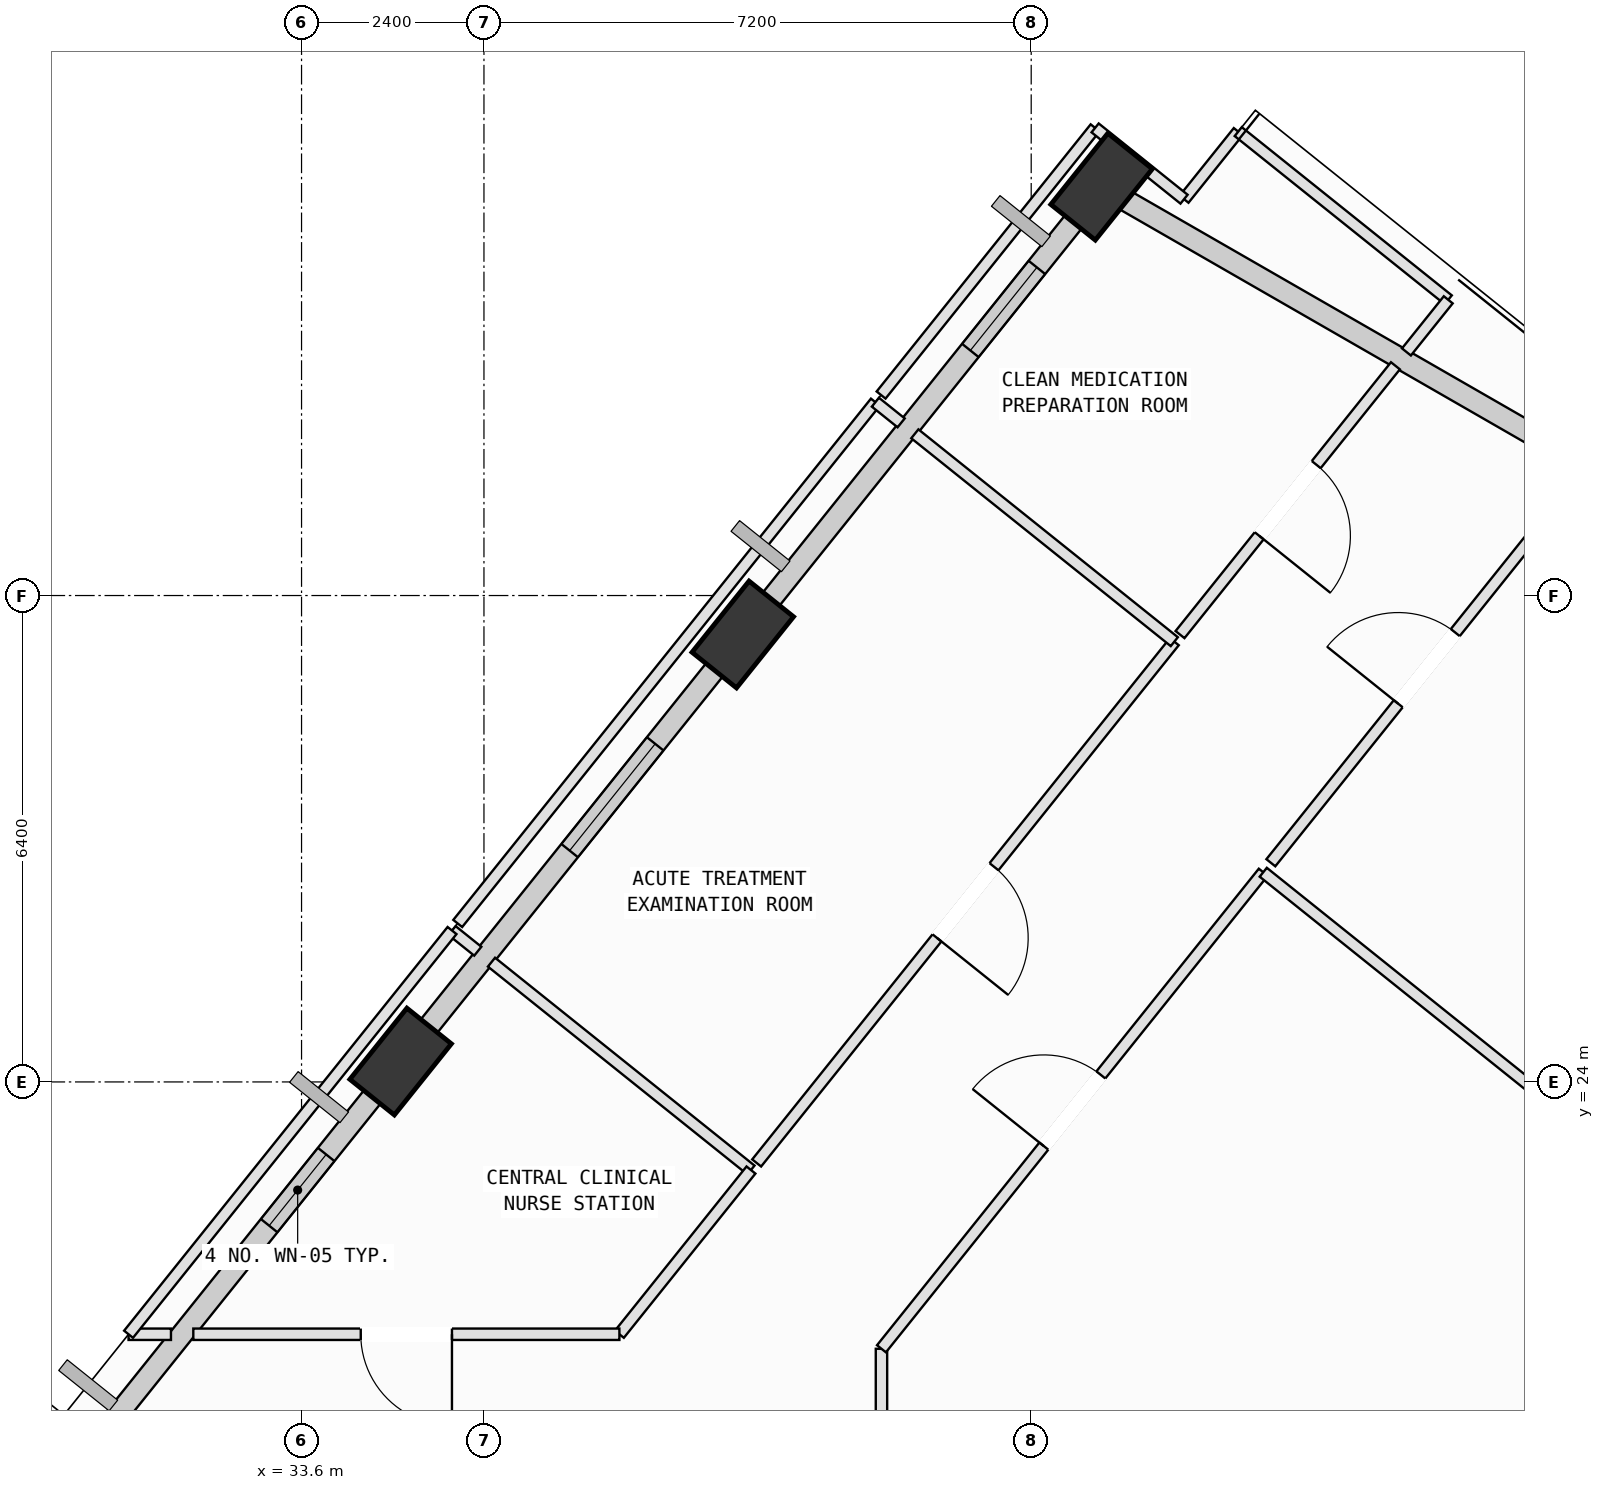
"""IFC4 building model, lengths in metres.
Left out: names, types, materials, properties, quantities, classifications, styles, units other than length and angle.
Written with IfcOpenShell. Run it as: python <this file> out.ifc"""

import sys

from ifc_helpers import new_model, si_unit, direction, frame, frame_2d, origin, origin_2d, place, context, subcontext, project, spatial, rectangle, extrude, element, fill, save


model = new_model("IFC4")
c1 = context("Model", 3, precision=1e-05, world=origin(), true_north=direction((0.0, 1.0)))
c2 = subcontext(c1, "Body", "Model", "MODEL_VIEW")
j1 = project(units=[si_unit("LENGTHUNIT", "METRE"), si_unit("PLANEANGLEUNIT", "RADIAN")], contexts=[c1])
p1 = place(None, origin())
s1 = spatial("IfcSite", under=j1, at=p1, CompositionType="ELEMENT")
p2 = place(p1, origin())
s2 = spatial("IfcBuilding", under=s1, at=p2, CompositionType="ELEMENT")
p3 = place(p2, frame((0.0, 0.0, 243.2)))
s3 = spatial("IfcBuildingStorey", under=s2, at=p3, CompositionType="ELEMENT", Elevation=243.2)
p4 = place(p3, frame((44.126, 35.78, 0.002), z_axis=(-0.045788475912, 0.043166765574, 0.998018058866), x_axis=(0.137842750982, -0.989235806213, 0.049111054847)))
e1 = element("IfcColumn", 1, at=p4, inside=s3, PredefinedType="COLUMN", context=c2, shape_type="SweptSolid", body=[
    extrude(rectangle(XDim=1.2, YDim=0.75, at=origin_2d()), origin(), (0.0, 0.0, 1.0), 4.004),
])
p5 = place(p3, frame((39.405, 29.887, 0.002), z_axis=(-0.021248837038, 0.02387441173, 0.999489119195), x_axis=(0.051546254437, -0.998359061972, 0.024943276301)))
e2 = element("IfcColumn", 2, at=p5, inside=s3, PredefinedType="COLUMN", context=c2, shape_type="SweptSolid", body=[
    extrude(rectangle(XDim=1.2, YDim=0.75, at=origin_2d()), origin(), (0.0, 0.0, 1.0), 3.998),
])
p6 = place(p3, frame((34.904, 24.268, 0.002), z_axis=(0.0021992413, 0.005437013213, 0.999982800965), x_axis=(-0.872261093327, -0.489019053167, 0.004577194397)))
e3 = element("IfcColumn", 3, at=p6, inside=s3, PredefinedType="COLUMN", context=c2, shape_type="SweptSolid", body=[
    extrude(rectangle(XDim=1.2, YDim=0.75, at=origin_2d()), origin(), (0.0, 0.0, 1.0), 3.996),
])
p7 = place(p3, frame((44.363, 35.643, 0.0), z_axis=(0.0, 0.0, 1.0), x_axis=(0.86682135291, -0.498618834521, 0.0)))
e4 = element("IfcWall", 4, at=p7, inside=s3, PredefinedType="SOLIDWALL", context=c2, shape_type="SweptSolid", body=[
    extrude(rectangle(XDim=9.036, YDim=0.28, at=frame_2d((4.518, 0.0))), origin(), (0.0, 0.0, 1.0), 3.265),
])
p8 = place(p3, frame((39.657, 30.202, 0.0), z_axis=(0.0, 0.0, 1.0), x_axis=(0.625252613866, 0.780422429748, 0.0)))
e5 = element("IfcWall", 5, at=p8, inside=s3, PredefinedType="SOLIDWALL", context=c2, shape_type="SweptSolid", body=[
    extrude(rectangle(XDim=6.78, YDim=0.28, at=frame_2d((3.39, 0.0))), origin(), (0.0, 0.0, 1.0), 3.265),
])
p9 = place(p8, frame((4.386, 0.0, 0.75)))
e6 = element("IfcOpeningElement", 6, at=p9, cuts=e5, PredefinedType="OPENING", context=c2, shape_type="SweptSolid", body=[
    extrude(rectangle(XDim=1.4, YDim=1.85, at=frame_2d((0.7, 0.925))), frame((0.0, 0.15, 0.0), z_axis=(0.0, -1.0, 0.0), x_axis=(1.0, 0.0, 0.0)), (0.0, 0.0, 1.0), 0.3),
])
p10 = place(p3, frame((35.159, 24.587, 0.0), z_axis=(0.0, 0.0, 1.0), x_axis=(0.625266247594, 0.780411506591, 0.0)))
e7 = element("IfcWall", 7, at=p10, inside=s3, PredefinedType="SOLIDWALL", context=c2, shape_type="SweptSolid", body=[
    extrude(rectangle(XDim=6.409, YDim=0.28, at=frame_2d((3.205, 0.0))), origin(), (0.0, 0.0, 1.0), 3.265),
])
p11 = place(p10, frame((3.148, 0.0, 0.75)))
e8 = element("IfcOpeningElement", 8, at=p11, cuts=e7, PredefinedType="OPENING", context=c2, shape_type="SweptSolid", body=[
    extrude(rectangle(XDim=1.8, YDim=2.05, at=frame_2d((0.9, 1.025))), frame((0.0, 0.15, 0.0), z_axis=(0.0, -1.0, 0.0), x_axis=(1.0, 0.0, 0.0)), (0.0, 0.0, 1.0), 0.3),
])
p12 = place(p3, frame((30.812, 19.16, 0.0), z_axis=(0.0, 0.0, 1.0), x_axis=(0.625231549592, 0.780439305388, 0.0)))
e9 = element("IfcWall", 9, at=p12, inside=s3, PredefinedType="SOLIDWALL", context=c2, shape_type="SweptSolid", body=[
    extrude(rectangle(XDim=6.158, YDim=0.28, at=frame_2d((3.079, 0.0))), origin(), (0.0, 0.0, 1.0), 3.265),
])
p13 = place(p12, frame((3.778, 0.0, 0.75)))
e10 = element("IfcOpeningElement", 10, at=p13, cuts=e9, PredefinedType="OPENING", context=c2, shape_type="SweptSolid", body=[
    extrude(rectangle(XDim=1.2, YDim=1.75, at=frame_2d((0.6, 0.875))), frame((0.0, 0.15, 0.0), z_axis=(0.0, -1.0, 0.0), x_axis=(1.0, 0.0, 0.0)), (0.0, 0.0, 1.0), 0.3),
])
p14 = place(p3, frame((28.6, 20.413, 0.0), z_axis=(0.0, 0.0, 1.0), x_axis=(0.78039569027, -0.625285987856, 0.0)))
e11 = element("IfcWall", 11, at=p14, inside=s3, PredefinedType="SOLIDWALL", context=c2, shape_type="SweptSolid", body=[
    extrude(rectangle(XDim=2.166, YDim=0.28, at=frame_2d((1.083, 0.0))), origin(), (0.0, 0.0, 1.0), 3.165),
])
p15 = place(p3, frame((41.23, 17.95, 0.0), z_axis=(0.0, 0.0, 1.0), x_axis=(0.0, 1.0, 0.0)))
e12 = element("IfcWall", 12, at=p15, inside=s3, PredefinedType="PARTITIONING", context=c2, shape_type="SweptSolid", body=[
    extrude(rectangle(XDim=2.539, YDim=0.15, at=frame_2d((1.27, 0.0))), origin(), (0.0, 0.0, 1.0), 3.78),
])
p16 = place(p3, frame((41.23, 20.489, 0.0), z_axis=(0.0, 0.0, 1.0), x_axis=(0.625221152435, 0.780447634725, 0.0)))
e13 = element("IfcWall", 13, at=p16, inside=s3, PredefinedType="PARTITIONING", context=c2, shape_type="SweptSolid", body=[
    extrude(rectangle(XDim=8.034, YDim=0.15, at=frame_2d((4.017, 0.0))), origin(), (0.0, 0.0, 1.0), 3.78),
])
p17 = place(p16, frame((3.417, 0.0, 0.0)))
e14 = element("IfcOpeningElement", 14, at=p17, cuts=e13, PredefinedType="OPENING", context=c2, shape_type="SweptSolid", body=[
    extrude(rectangle(XDim=1.2, YDim=2.15, at=frame_2d((0.6, 1.075))), frame((0.0, 0.085, 0.0), z_axis=(0.0, -1.0, 0.0), x_axis=(1.0, 0.0, 0.0)), (0.0, 0.0, 1.0), 0.17),
])
p18 = place(p3, frame((46.253, 26.759, 0.0), z_axis=(0.0, 0.0, 1.0), x_axis=(0.780405841244, -0.6252733186, 0.0)))
e15 = element("IfcWall", 15, at=p18, inside=s3, PredefinedType="PARTITIONING", context=c2, shape_type="SweptSolid", body=[
    extrude(rectangle(XDim=13.486, YDim=0.15, at=frame_2d((6.743, 0.0))), origin(), (0.0, 0.0, 1.0), 3.78),
])
p19 = place(p3, frame((46.353, 26.884, 0.0), z_axis=(0.0, 0.0, 1.0), x_axis=(0.625284721196, 0.780396705169, 0.0)))
e16 = element("IfcWall", 16, at=p19, inside=s3, PredefinedType="PARTITIONING", context=c2, shape_type="SweptSolid", body=[
    extrude(rectangle(XDim=6.562, YDim=0.15, at=frame_2d((3.281, 0.0))), origin(), (0.0, 0.0, 1.0), 3.78),
])
p20 = place(p19, frame((2.681, 0.0, 0.0)))
e17 = element("IfcOpeningElement", 17, at=p20, cuts=e16, PredefinedType="OPENING", context=c2, shape_type="SweptSolid", body=[
    extrude(rectangle(XDim=1.2, YDim=2.15, at=frame_2d((0.6, 1.075))), frame((0.0, 0.085, 0.0), z_axis=(0.0, -1.0, 0.0), x_axis=(1.0, 0.0, 0.0)), (0.0, 0.0, 1.0), 0.17),
])
p21 = place(p3, frame((35.58, 25.992, 0.0), z_axis=(0.0, 0.0, 1.0), x_axis=(0.779881129796, -0.625927650283, 0.0)))
e18 = element("IfcWall", 18, at=p21, inside=s3, PredefinedType="PARTITIONING", context=c2, shape_type="SweptSolid", body=[
    extrude(rectangle(XDim=0.435, YDim=0.15, at=frame_2d((0.217, 0.0))), origin(), (0.0, 0.0, 1.0), 3.78),
])
p22 = place(p3, frame((36.099, 25.576, 0.0), z_axis=(0.0, 0.0, 1.0), x_axis=(0.780443899809, -0.625225814607, 0.0)))
e19 = element("IfcWall", 19, at=p22, inside=s3, PredefinedType="PARTITIONING", context=c2, shape_type="SweptSolid", body=[
    extrude(rectangle(XDim=4.374, YDim=0.15, at=frame_2d((2.187, 0.0))), origin(), (0.0, 0.0, 1.0), 3.78),
])
p23 = place(p3, frame((39.513, 22.841, 0.0), z_axis=(0.0, 0.0, 1.0), x_axis=(-0.625146560875, -0.780507384607, 0.0)))
e20 = element("IfcWall", 20, at=p23, inside=s3, PredefinedType="PARTITIONING", context=c2, shape_type="SweptSolid", body=[
    extrude(rectangle(XDim=2.769, YDim=0.15, at=frame_2d((1.384, 0.0))), origin(), (0.0, 0.0, 1.0), 3.78),
])
p24 = place(p3, frame((37.782, 20.68, 0.0), z_axis=(0.0, 0.0, 1.0), x_axis=(-1.0, 0.0, 0.0)))
e21 = element("IfcWall", 21, at=p24, inside=s3, PredefinedType="PARTITIONING", context=c2, shape_type="SweptSolid", body=[
    extrude(rectangle(XDim=5.606, YDim=0.15, at=frame_2d((2.803, 0.0))), origin(), (0.0, 0.0, 1.0), 3.415),
])
p25 = place(p24, frame((2.203, 0.0, 0.0)))
e22 = element("IfcOpeningElement", 22, at=p25, cuts=e21, PredefinedType="OPENING", context=c2, shape_type="SweptSolid", body=[
    extrude(rectangle(XDim=1.2, YDim=2.15, at=frame_2d((0.6, 1.075))), frame((0.0, 0.085, 0.0), z_axis=(0.0, -1.0, 0.0), x_axis=(1.0, 0.0, 0.0)), (0.0, 0.0, 1.0), 0.17),
])
p26 = place(p3, frame((31.882, 20.68, 0.0), z_axis=(0.0, 0.0, 1.0), x_axis=(-1.0, 0.0, 0.0)))
e23 = element("IfcWall", 23, at=p26, inside=s3, PredefinedType="PARTITIONING", context=c2, shape_type="SweptSolid", body=[
    extrude(rectangle(XDim=0.558, YDim=0.15, at=frame_2d((0.279, 0.0))), origin(), (0.0, 0.0, 1.0), 3.78),
])
p27 = place(p3, frame((31.324, 20.68, 0.0), z_axis=(0.0, 0.0, 1.0), x_axis=(0.625276626148, 0.780403191173, 0.0)))
e24 = element("IfcWall", 24, at=p27, inside=s3, PredefinedType="PARTITIONING", context=c2, shape_type="SweptSolid", body=[
    extrude(rectangle(XDim=6.807, YDim=0.15, at=frame_2d((3.403, 0.0))), origin(), (0.0, 0.0, 1.0), 3.78),
])
p28 = place(p3, frame((45.083, 29.793, 0.0), z_axis=(0.0, 0.0, 1.0), x_axis=(-0.625250470094, -0.780424147273, 0.0)))
e25 = element("IfcWall", 25, at=p28, inside=s3, PredefinedType="PARTITIONING", context=c2, shape_type="SweptSolid", body=[
    extrude(rectangle(XDim=8.789, YDim=0.15, at=frame_2d((4.394, 0.0))), origin(), (0.0, 0.0, 1.0), 3.78),
])
p29 = place(p28, frame((3.794, 0.0, 0.0)))
e26 = element("IfcOpeningElement", 26, at=p29, cuts=e25, PredefinedType="OPENING", context=c2, shape_type="SweptSolid", body=[
    extrude(rectangle(XDim=1.2, YDim=2.15, at=frame_2d((0.6, 1.075))), frame((0.0, 0.085, 0.0), z_axis=(0.0, -1.0, 0.0), x_axis=(1.0, 0.0, 0.0)), (0.0, 0.0, 1.0), 0.17),
])
p30 = place(p3, frame((35.655, 26.085, 0.0), z_axis=(0.0, 0.0, 1.0), x_axis=(0.625219995527, 0.780448561529, 0.0)))
e27 = element("IfcWall", 27, at=p30, inside=s3, PredefinedType="PARTITIONING", context=c2, shape_type="SweptSolid", body=[
    extrude(rectangle(XDim=8.789, YDim=0.15, at=frame_2d((4.395, 0.0))), origin(), (0.0, 0.0, 1.0), 3.265),
])
p31 = place(p3, frame((41.15, 32.944, 0.0), z_axis=(0.0, 0.0, 1.0), x_axis=(0.780101119222, -0.625653453429, 0.0)))
e28 = element("IfcWall", 28, at=p31, inside=s3, PredefinedType="PARTITIONING", context=c2, shape_type="SweptSolid", body=[
    extrude(rectangle(XDim=0.435, YDim=0.15, at=frame_2d((0.217, 0.0))), origin(), (0.0, 0.0, 1.0), 3.78),
])
p32 = place(p3, frame((41.669, 32.528, 0.0), z_axis=(0.0, 0.0, 1.0), x_axis=(0.780438483682, -0.625232575278, 0.0)))
e29 = element("IfcWall", 29, at=p32, inside=s3, PredefinedType="PARTITIONING", context=c2, shape_type="SweptSolid", body=[
    extrude(rectangle(XDim=4.375, YDim=0.15, at=frame_2d((2.187, 0.0))), origin(), (0.0, 0.0, 1.0), 3.78),
])
p33 = place(p3, frame((45.211, 35.615, 0.0), z_axis=(0.0, 0.0, 1.0), x_axis=(0.625765609441, 0.780011155075, 0.0)))
e30 = element("IfcWall", 30, at=p33, inside=s3, PredefinedType="PARTITIONING", context=c2, shape_type="SweptSolid", body=[
    extrude(rectangle(XDim=1.14, YDim=0.15, at=frame_2d((0.57, 0.0))), origin(), (0.0, 0.0, 1.0), 3.78),
])
p34 = place(p3, frame((45.924, 36.504, 0.0), z_axis=(0.0, 0.0, 1.0), x_axis=(0.780518796961, -0.625132312067, 0.0)))
e31 = element("IfcWall", 31, at=p34, inside=s3, PredefinedType="PARTITIONING", context=c2, shape_type="SweptSolid", body=[
    extrude(rectangle(XDim=3.54, YDim=0.15, at=frame_2d((1.77, 0.0))), origin(), (0.0, 0.0, 1.0), 3.78),
])
p35 = place(p3, frame((48.687, 34.291, 0.0), z_axis=(0.0, 0.0, 1.0), x_axis=(-0.625541168614, -0.780191160145, 0.0)))
e32 = element("IfcWall", 32, at=p35, inside=s3, PredefinedType="PARTITIONING", context=c2, shape_type="SweptSolid", body=[
    extrude(rectangle(XDim=0.879, YDim=0.15, at=frame_2d((0.44, 0.0))), origin(), (0.0, 0.0, 1.0), 3.78),
])
p36 = place(p3, frame((47.992, 33.423, 0.0), z_axis=(0.0, 0.0, 1.0), x_axis=(-0.625272947214, -0.780406138804, 0.0)))
e33 = element("IfcWall", 33, at=p36, inside=s3, PredefinedType="PARTITIONING", context=c2, shape_type="SweptSolid", body=[
    extrude(rectangle(XDim=4.532, YDim=0.15, at=frame_2d((2.266, 0.0))), origin(), (0.0, 0.0, 1.0), 3.78),
])
p37 = place(p36, frame((1.666, 0.0, 0.0)))
e34 = element("IfcOpeningElement", 34, at=p37, cuts=e33, PredefinedType="OPENING", context=c2, shape_type="SweptSolid", body=[
    extrude(rectangle(XDim=1.2, YDim=2.15, at=frame_2d((0.6, 1.075))), frame((0.0, 0.085, 0.0), z_axis=(0.0, -1.0, 0.0), x_axis=(1.0, 0.0, 0.0)), (0.0, 0.0, 1.0), 0.17),
])
p38 = place(p3, frame((41.225, 33.038, 0.0), z_axis=(0.0, 0.0, 1.0), x_axis=(0.625236978682, 0.780434955963, 0.0)))
e35 = element("IfcWall", 35, at=p38, inside=s3, PredefinedType="PARTITIONING", context=c2, shape_type="SweptSolid", body=[
    extrude(rectangle(XDim=4.504, YDim=0.15, at=frame_2d((2.252, 0.0))), origin(), (0.0, 0.0, 1.0), 3.265),
])
p39 = place(p3, frame((44.041, 36.553, 0.0), z_axis=(0.0, 0.0, 1.0), x_axis=(0.78020122682, -0.625528612989, 0.0)))
e36 = element("IfcWall", 36, at=p39, inside=s3, PredefinedType="PARTITIONING", context=c2, shape_type="SweptSolid", body=[
    extrude(rectangle(XDim=1.5, YDim=0.15, at=frame_2d((0.75, 0.0))), origin(), (0.0, 0.0, 1.0), 3.265),
])
p40 = place(p9, origin())
e37 = element("IfcWindow", 37, at=p40, inside=s3, PartitioningType="SINGLE_PANEL", PredefinedType="WINDOW", context=c2, shape_type="SweptSolid", body=[
    extrude(rectangle(XDim=1.4, YDim=1.85, at=frame_2d((0.7, 0.925))), frame((0.0, 0.03, 0.0), z_axis=(0.0, -1.0, 0.0), x_axis=(1.0, 0.0, 0.0)), (0.0, 0.0, 1.0), 0.06),
])
fill(e6, e37)
p41 = place(p11, origin())
e38 = element("IfcWindow", 38, at=p41, inside=s3, PartitioningType="SINGLE_PANEL", PredefinedType="WINDOW", context=c2, shape_type="SweptSolid", body=[
    extrude(rectangle(XDim=1.8, YDim=2.05, at=frame_2d((0.9, 1.025))), frame((0.0, 0.03, 0.0), z_axis=(0.0, -1.0, 0.0), x_axis=(1.0, 0.0, 0.0)), (0.0, 0.0, 1.0), 0.06),
])
fill(e8, e38)
p42 = place(p13, origin())
e39 = element("IfcWindow", 39, at=p42, inside=s3, PartitioningType="SINGLE_PANEL", PredefinedType="WINDOW", context=c2, shape_type="SweptSolid", body=[
    extrude(rectangle(XDim=1.2, YDim=1.75, at=frame_2d((0.6, 0.875))), frame((0.0, 0.03, 0.0), z_axis=(0.0, -1.0, 0.0), x_axis=(1.0, 0.0, 0.0)), (0.0, 0.0, 1.0), 0.06),
])
fill(e10, e39)
p43 = place(p17, origin())
e40 = element("IfcDoor", 40, at=p43, inside=s3, OperationType="SINGLE_SWING_LEFT", PredefinedType="DOOR", context=c2, shape_type="SweptSolid", body=[
    extrude(rectangle(XDim=1.2, YDim=2.15, at=frame_2d((0.6, 1.075))), frame((0.0, 0.025, 0.0), z_axis=(0.0, -1.0, 0.0), x_axis=(1.0, 0.0, 0.0)), (0.0, 0.0, 1.0), 0.05),
])
fill(e14, e40)
p44 = place(p20, origin())
e41 = element("IfcDoor", 41, at=p44, inside=s3, OperationType="SINGLE_SWING_LEFT", PredefinedType="DOOR", context=c2, shape_type="SweptSolid", body=[
    extrude(rectangle(XDim=1.2, YDim=2.15, at=frame_2d((0.6, 1.075))), frame((0.0, 0.025, 0.0), z_axis=(0.0, -1.0, 0.0), x_axis=(1.0, 0.0, 0.0)), (0.0, 0.0, 1.0), 0.05),
])
fill(e17, e41)
p45 = place(p25, origin())
e42 = element("IfcDoor", 42, at=p45, inside=s3, OperationType="SINGLE_SWING_LEFT", PredefinedType="DOOR", context=c2, shape_type="SweptSolid", body=[
    extrude(rectangle(XDim=1.2, YDim=2.15, at=frame_2d((0.6, 1.075))), frame((0.0, 0.025, 0.0), z_axis=(0.0, -1.0, 0.0), x_axis=(1.0, 0.0, 0.0)), (0.0, 0.0, 1.0), 0.05),
])
fill(e22, e42)
p46 = place(p29, origin())
e43 = element("IfcDoor", 43, at=p46, inside=s3, OperationType="SINGLE_SWING_RIGHT", PredefinedType="DOOR", context=c2, shape_type="SweptSolid", body=[
    extrude(rectangle(XDim=1.2, YDim=2.15, at=frame_2d((0.6, 1.075))), frame((0.0, 0.025, 0.0), z_axis=(0.0, -1.0, 0.0), x_axis=(1.0, 0.0, 0.0)), (0.0, 0.0, 1.0), 0.05),
])
fill(e26, e43)
p47 = place(p37, origin())
e44 = element("IfcDoor", 44, at=p47, inside=s3, OperationType="SINGLE_SWING_RIGHT", PredefinedType="DOOR", context=c2, shape_type="SweptSolid", body=[
    extrude(rectangle(XDim=1.2, YDim=2.15, at=frame_2d((0.6, 1.075))), frame((0.0, 0.025, 0.0), z_axis=(0.0, -1.0, 0.0), x_axis=(1.0, 0.0, 0.0)), (0.0, 0.0, 1.0), 0.05),
])
fill(e34, e44)
save(model, sys.argv[1])
